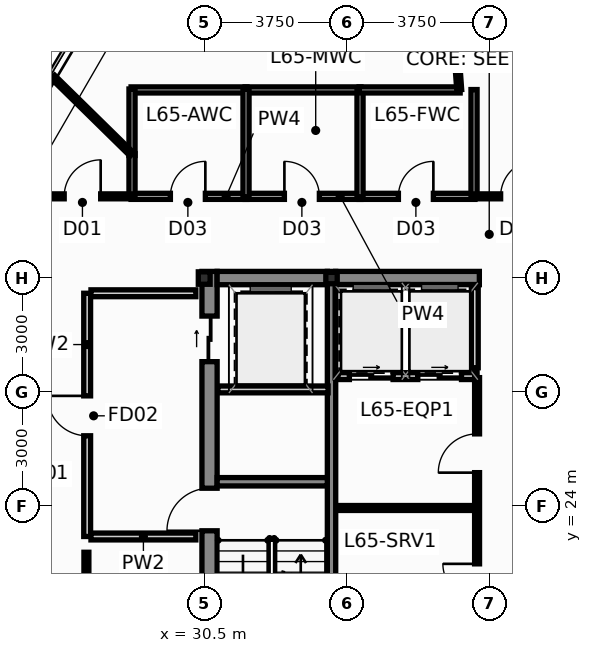
"""IFC4 building model, lengths in metres.
Left out: names, types, materials, properties, quantities, classifications, styles, units other than length and angle.
Written with IfcOpenShell. Run it as: python <this file> out.ifc"""

import sys

from ifc_helpers import new_model, si_unit, direction, frame, frame_2d, origin, origin_2d, place, context, subcontext, project, spatial, rectangle, hollow_rectangle, i_section, extrude, source, transform, mapped, element, fill, save


model = new_model("IFC4")
c1 = context("Model", 3, precision=1e-05, world=origin(), true_north=direction((0.0, 1.0)))
c2 = subcontext(c1, "Body", "Model", "MODEL_VIEW")
j1 = project(units=[si_unit("LENGTHUNIT", "METRE"), si_unit("PLANEANGLEUNIT", "RADIAN")], contexts=[c1])
p1 = place(None, origin())
s1 = spatial("IfcSite", under=j1, at=p1, CompositionType="ELEMENT")
p2 = place(p1, origin())
s2 = spatial("IfcBuilding", under=s1, at=p2, CompositionType="ELEMENT")
p3 = place(p2, frame((0.0, 0.0, 248.1)))
s3 = spatial("IfcBuildingStorey", under=s2, at=p3, CompositionType="ELEMENT", Elevation=248.1)
m1 = source(origin(), c2, "Body", "SweptSolid", [
    extrude(i_section(OverallWidth=0.311, OverallDepth=0.327, WebThickness=0.016, FlangeThickness=0.025, at=origin_2d()), origin(), (0.0, 0.0, 1.0), 3.65),
])
p4 = place(p3, frame((30.5, 30.0, 0.0), z_axis=(0.0, 0.0, 1.0), x_axis=(1.0, 0.0, 0.0)))
e1 = element("IfcColumn", 1, at=p4, inside=s3, PredefinedType="COLUMN", context=c2, shape_type="MappedRepresentation", body=[
    mapped(m1, transform((0.0, 0.0, 0.0), scale=1.0)),
])
m2 = source(origin(), c2, "Body", "SweptSolid", [
    extrude(hollow_rectangle(XDim=0.3, YDim=0.3, WallThickness=0.012, at=origin_2d()), origin(), (0.0, 0.0, 1.0), 3.65),
])
p5 = place(p3, frame((33.85, 30.0, 0.0), z_axis=(0.0, 0.0, 1.0), x_axis=(1.0, 0.0, 0.0)))
e2 = element("IfcColumn", 2, at=p5, inside=s3, PredefinedType="COLUMN", context=c2, shape_type="MappedRepresentation", body=[
    mapped(m2, transform((0.0, 0.0, 0.0), scale=1.0)),
])
p6 = place(p3, frame((30.64, 17.05, 0.0), z_axis=(0.0, 0.0, 1.0), x_axis=(0.0, 1.0, 0.0)))
e3 = element("IfcWall", 3, at=p6, inside=s3, PredefinedType="SHEAR", context=c2, shape_type="SweptSolid", body=[
    extrude(rectangle(XDim=13.125, YDim=0.4, at=frame_2d((6.562, 0.0))), origin(), (0.0, 0.0, 1.0), 3.65),
])
p7 = place(p6, frame((6.3, 0.0, 0.0)))
e4 = element("IfcOpeningElement", 4, at=p7, cuts=e3, PredefinedType="OPENING", context=c2, shape_type="SweptSolid", body=[
    extrude(rectangle(XDim=1.12, YDim=2.15, at=frame_2d((0.56, 1.075))), frame((0.0, 0.212, 0.0), z_axis=(0.0, -1.0, 0.0), x_axis=(1.0, 0.0, 0.0)), (0.0, 0.0, 1.0), 0.424),
])
p8 = place(p6, frame((10.75, 0.0, 0.0)))
e5 = element("IfcOpeningElement", 5, at=p8, cuts=e3, PredefinedType="OPENING", context=c2, shape_type="SweptSolid", body=[
    extrude(rectangle(XDim=1.2, YDim=2.2, at=frame_2d((0.6, 1.1))), frame((0.0, 0.212, 0.0), z_axis=(0.0, -1.0, 0.0), x_axis=(1.0, 0.0, 0.0)), (0.0, 0.0, 1.0), 0.424),
])
p9 = place(p3, frame((30.84, 30.0, 0.0), z_axis=(0.0, 0.0, 1.0), x_axis=(1.0, 0.0, 0.0)))
e6 = element("IfcWall", 6, at=p9, inside=s3, PredefinedType="SHEAR", context=c2, shape_type="SweptSolid", body=[
    extrude(rectangle(XDim=2.9, YDim=0.35, at=frame_2d((1.45, 0.0))), origin(), (0.0, 0.0, 1.0), 3.65),
])
p10 = place(p3, frame((33.96, 30.0, 0.0), z_axis=(0.0, 0.0, 1.0), x_axis=(1.0, 0.0, 0.0)))
e7 = element("IfcWall", 7, at=p10, inside=s3, PredefinedType="SHEAR", context=c2, shape_type="SweptSolid", body=[
    extrude(rectangle(XDim=3.78, YDim=0.35, at=frame_2d((1.89, 0.0))), origin(), (0.0, 0.0, 1.0), 3.65),
])
p11 = place(p3, frame((33.85, 17.05, 0.0), z_axis=(0.0, 0.0, 1.0), x_axis=(0.0, 1.0, 0.0)))
e8 = element("IfcWall", 8, at=p11, inside=s3, PredefinedType="SHEAR", context=c2, shape_type="SweptSolid", body=[
    extrude(rectangle(XDim=13.125, YDim=0.22, at=frame_2d((6.562, 0.0))), origin(), (0.0, 0.0, 1.0), 3.65),
])
p12 = place(p3, frame((30.84, 24.64, 0.0), z_axis=(0.0, 0.0, 1.0), x_axis=(1.0, 0.0, 0.0)))
e9 = element("IfcWall", 9, at=p12, inside=s3, PredefinedType="SHEAR", context=c2, shape_type="SweptSolid", body=[
    extrude(rectangle(XDim=2.9, YDim=0.22, at=frame_2d((1.45, 0.0))), origin(), (0.0, 0.0, 1.0), 3.65),
])
p13 = place(p3, frame((34.02, 27.42, 0.0), z_axis=(0.0, 0.0, 1.0), x_axis=(1.0, 0.0, 0.0)))
e10 = element("IfcWall", 10, at=p13, inside=s3, PredefinedType="PARTITIONING", context=c2, shape_type="SweptSolid", body=[
    extrude(rectangle(XDim=3.66, YDim=0.18, at=frame_2d((1.83, 0.0))), origin(), (0.0, 0.0, 1.0), 3.4),
])
p14 = place(p13, frame((0.3, 0.0, 0.0)))
e11 = element("IfcOpeningElement", 11, at=p14, cuts=e10, PredefinedType="OPENING", context=c2, shape_type="SweptSolid", body=[
    extrude(rectangle(XDim=1.15, YDim=2.2, at=frame_2d((0.575, 1.1))), frame((0.0, 0.102, 0.0), z_axis=(0.0, -1.0, 0.0), x_axis=(1.0, 0.0, 0.0)), (0.0, 0.0, 1.0), 0.204),
])
p15 = place(p13, frame((2.1, 0.0, 0.0)))
e12 = element("IfcOpeningElement", 12, at=p15, cuts=e10, PredefinedType="OPENING", context=c2, shape_type="SweptSolid", body=[
    extrude(rectangle(XDim=1.15, YDim=2.2, at=frame_2d((0.575, 1.1))), frame((0.0, 0.102, 0.0), z_axis=(0.0, -1.0, 0.0), x_axis=(1.0, 0.0, 0.0)), (0.0, 0.0, 1.0), 0.204),
])
p16 = place(p3, frame((37.62, 27.64, 0.0), z_axis=(0.0, 0.0, 1.0), x_axis=(0.0, 1.0, 0.0)))
e13 = element("IfcWall", 13, at=p16, inside=s3, PredefinedType="PARTITIONING", context=c2, shape_type="SweptSolid", body=[
    extrude(rectangle(XDim=2.11, YDim=0.18, at=frame_2d((1.055, 0.0))), origin(), (0.0, 0.0, 1.0), 3.4),
])
p17 = place(p3, frame((27.42, 23.2, 0.0), z_axis=(0.0, 0.0, 1.0), x_axis=(0.0, 1.0, 0.0)))
e14 = element("IfcWall", 14, at=p17, inside=s3, PredefinedType="PARTITIONING", context=c2, shape_type="SweptSolid", body=[
    extrude(rectangle(XDim=6.4, YDim=0.18, at=frame_2d((3.2, 0.0))), origin(), (0.0, 0.0, 1.0), 3.085),
])
p18 = place(p17, frame((2.65, 0.0, 0.0)))
e15 = element("IfcOpeningElement", 15, at=p18, cuts=e14, PredefinedType="OPENING", context=c2, shape_type="SweptSolid", body=[
    extrude(rectangle(XDim=1.05, YDim=2.15, at=frame_2d((0.525, 1.075))), frame((0.0, 0.102, 0.0), z_axis=(0.0, -1.0, 0.0), x_axis=(1.0, 0.0, 0.0)), (0.0, 0.0, 1.0), 0.204),
])
for number, where, z_axis, x_axis in (
    (16, (27.52, 23.2, 0.0), (0.0, 0.0, 1.0), (1.0, 0.0, 0.0)),
    (17, (27.52, 29.6, 0.0), (0.0, 0.0, 1.0), (1.0, 0.0, 0.0)),
):
    element("IfcWall", number, at=place(p3, frame(where, z_axis=z_axis, x_axis=x_axis)), inside=s3, PredefinedType="PARTITIONING", context=c2, shape_type="SweptSolid", body=[
        extrude(rectangle(XDim=2.76, YDim=0.18, at=frame_2d((1.38, 0.0))), origin(), (0.0, 0.0, 1.0), 3.4),
    ])
p19 = place(p3, frame((30.86, 27.07, 0.0), z_axis=(0.0, 0.0, 1.0), x_axis=(1.0, 0.0, 0.0)))
e18 = element("IfcWall", 18, at=p19, inside=s3, PredefinedType="PARTITIONING", context=c2, shape_type="SweptSolid", body=[
    extrude(rectangle(XDim=2.9, YDim=0.18, at=frame_2d((1.45, 0.0))), origin(), (0.0, 0.0, 1.0), 3.4),
])
p20 = place(p3, frame((34.02, 23.95, 0.0), z_axis=(0.0, 0.0, 1.0), x_axis=(1.0, 0.0, 0.0)))
e19 = element("IfcWall", 19, at=p20, inside=s3, PredefinedType="PARTITIONING", context=c2, shape_type="SweptSolid", body=[
    extrude(rectangle(XDim=3.58, YDim=0.13, at=frame_2d((1.79, 0.0))), origin(), (0.0, 0.0, 1.0), 3.4),
])
p21 = place(p3, frame((37.68, 20.48, 0.0), z_axis=(0.0, 0.0, 1.0), x_axis=(0.0, 1.0, 0.0)))
e20 = element("IfcWall", 20, at=p21, inside=s3, PredefinedType="PARTITIONING", context=c2, shape_type="SweptSolid", body=[
    extrude(rectangle(XDim=6.9, YDim=0.13, at=frame_2d((3.45, 0.0))), origin(), (0.0, 0.0, 1.0), 3.4),
])
p22 = place(p21, frame((1.1, 0.0, 0.0)))
e21 = element("IfcOpeningElement", 21, at=p22, cuts=e20, PredefinedType="OPENING", context=c2, shape_type="SweptSolid", body=[
    extrude(rectangle(XDim=0.9, YDim=2.1, at=frame_2d((0.45, 1.05))), frame((0.0, 0.077, 0.0), z_axis=(0.0, -1.0, 0.0), x_axis=(1.0, 0.0, 0.0)), (0.0, 0.0, 1.0), 0.154),
])
p23 = place(p21, frame((4.4, 0.0, 0.0)))
e22 = element("IfcOpeningElement", 22, at=p23, cuts=e20, PredefinedType="OPENING", context=c2, shape_type="SweptSolid", body=[
    extrude(rectangle(XDim=1.02, YDim=2.15, at=frame_2d((0.51, 1.075))), frame((0.0, 0.077, 0.0), z_axis=(0.0, -1.0, 0.0), x_axis=(1.0, 0.0, 0.0)), (0.0, 0.0, 1.0), 0.154),
])
p24 = place(p3, frame((28.575, 32.15, 0.0), z_axis=(0.0, 0.0, 1.0), x_axis=(1.0, 0.0, 0.0)))
e23 = element("IfcWall", 23, at=p24, inside=s3, PredefinedType="PLUMBINGWALL", context=c2, shape_type="SweptSolid", body=[
    extrude(rectangle(XDim=3.05, YDim=0.16, at=frame_2d((1.525, 0.0))), origin(), (0.0, 0.0, 1.0), 3.085),
])
p25 = place(p24, frame((1.035, 0.0, 0.0)))
e24 = element("IfcOpeningElement", 24, at=p25, cuts=e23, PredefinedType="OPENING", context=c2, shape_type="SweptSolid", body=[
    extrude(rectangle(XDim=0.92, YDim=2.1, at=frame_2d((0.46, 1.05))), frame((0.0, 0.092, 0.0), z_axis=(0.0, -1.0, 0.0), x_axis=(1.0, 0.0, 0.0)), (0.0, 0.0, 1.0), 0.184),
])
p26 = place(p3, frame((31.575, 32.15, 0.0), z_axis=(0.0, 0.0, 1.0), x_axis=(1.0, 0.0, 0.0)))
e25 = element("IfcWall", 25, at=p26, inside=s3, PredefinedType="PLUMBINGWALL", context=c2, shape_type="SweptSolid", body=[
    extrude(rectangle(XDim=3.05, YDim=0.16, at=frame_2d((1.525, 0.0))), origin(), (0.0, 0.0, 1.0), 3.085),
])
p27 = place(p26, frame((1.035, 0.0, 0.0)))
e26 = element("IfcOpeningElement", 26, at=p27, cuts=e25, PredefinedType="OPENING", context=c2, shape_type="SweptSolid", body=[
    extrude(rectangle(XDim=0.92, YDim=2.1, at=frame_2d((0.46, 1.05))), frame((0.0, 0.092, 0.0), z_axis=(0.0, -1.0, 0.0), x_axis=(1.0, 0.0, 0.0)), (0.0, 0.0, 1.0), 0.184),
])
p28 = place(p3, frame((34.575, 32.15, 0.0), z_axis=(0.0, 0.0, 1.0), x_axis=(1.0, 0.0, 0.0)))
e27 = element("IfcWall", 27, at=p28, inside=s3, PredefinedType="PLUMBINGWALL", context=c2, shape_type="SweptSolid", body=[
    extrude(rectangle(XDim=3.05, YDim=0.16, at=frame_2d((1.525, 0.0))), origin(), (0.0, 0.0, 1.0), 3.085),
])
p29 = place(p28, frame((1.035, 0.0, 0.0)))
e28 = element("IfcOpeningElement", 28, at=p29, cuts=e27, PredefinedType="OPENING", context=c2, shape_type="SweptSolid", body=[
    extrude(rectangle(XDim=0.92, YDim=2.1, at=frame_2d((0.46, 1.05))), frame((0.0, 0.092, 0.0), z_axis=(0.0, -1.0, 0.0), x_axis=(1.0, 0.0, 0.0)), (0.0, 0.0, 1.0), 0.184),
])
for number, where, z_axis, x_axis in (
    (29, (28.575, 34.95, 0.0), (0.0, 0.0, 1.0), (1.0, 0.0, 0.0)),
    (30, (31.575, 34.95, 0.0), (0.0, 0.0, 1.0), (1.0, 0.0, 0.0)),
):
    element("IfcWall", number, at=place(p3, frame(where, z_axis=z_axis, x_axis=x_axis)), inside=s3, PredefinedType="PLUMBINGWALL", context=c2, shape_type="SweptSolid", body=[
        extrude(rectangle(XDim=3.05, YDim=0.16, at=frame_2d((1.525, 0.0))), origin(), (0.0, 0.0, 1.0), 3.085),
    ])
p30 = place(p3, frame((31.6, 32.125, 0.0), z_axis=(0.0, 0.0, 1.0), x_axis=(0.0, 1.0, 0.0)))
e31 = element("IfcWall", 31, at=p30, inside=s3, PredefinedType="PLUMBINGWALL", context=c2, shape_type="SweptSolid", body=[
    extrude(rectangle(XDim=2.85, YDim=0.16, at=frame_2d((1.425, 0.0))), origin(), (0.0, 0.0, 1.0), 2.985),
])
p31 = place(p3, frame((34.6, 32.125, 0.0), z_axis=(0.0, 0.0, 1.0), x_axis=(0.0, 1.0, 0.0)))
e32 = element("IfcWall", 32, at=p31, inside=s3, PredefinedType="PLUMBINGWALL", context=c2, shape_type="SweptSolid", body=[
    extrude(rectangle(XDim=2.85, YDim=0.16, at=frame_2d((1.425, 0.0))), origin(), (0.0, 0.0, 1.0), 3.4),
])
p32 = place(p3, frame((37.6, 32.125, 0.0), z_axis=(0.0, 0.0, 1.0), x_axis=(0.0, 1.0, 0.0)))
e33 = element("IfcWall", 33, at=p32, inside=s3, PredefinedType="PLUMBINGWALL", context=c2, shape_type="SweptSolid", body=[
    extrude(rectangle(XDim=2.835, YDim=0.16, at=frame_2d((1.417, 0.0))), origin(), (0.0, 0.0, 1.0), 3.4),
])
p33 = place(p3, frame((34.575, 34.95, 0.0), z_axis=(0.0, 0.0, 1.0), x_axis=(1.0, 0.0, 0.0)))
e34 = element("IfcWall", 34, at=p33, inside=s3, PredefinedType="PLUMBINGWALL", context=c2, shape_type="SweptSolid", body=[
    extrude(rectangle(XDim=2.66, YDim=0.16, at=frame_2d((1.33, 0.0))), origin(), (0.0, 0.0, 1.0), 3.085),
])
p34 = place(p3, frame((28.6, 33.225, 0.0), z_axis=(0.0, 0.0, 1.0), x_axis=(0.0, 1.0, 0.0)))
e35 = element("IfcWall", 35, at=p34, inside=s3, PredefinedType="PLUMBINGWALL", context=c2, shape_type="SweptSolid", body=[
    extrude(rectangle(XDim=1.75, YDim=0.16, at=frame_2d((0.875, 0.0))), origin(), (0.0, 0.0, 1.0), 2.985),
])
p35 = place(p3, frame((28.6, 32.125, 0.0), z_axis=(0.0, 0.0, 1.0), x_axis=(0.0, 1.0, 0.0)))
e36 = element("IfcWall", 36, at=p35, inside=s3, PredefinedType="PLUMBINGWALL", context=c2, shape_type="SweptSolid", body=[
    extrude(rectangle(XDim=1.15, YDim=0.16, at=frame_2d((0.575, 0.0))), origin(), (0.0, 0.0, 1.0), 3.4),
])
p36 = place(p3, frame((36.156, 49.7, 0.0), z_axis=(0.0, 0.0, 1.0), x_axis=(0.071265829402, -0.997457358266, 0.0)))
e37 = element("IfcWall", 37, at=p36, inside=s3, PredefinedType="PARTITIONING", context=c2, shape_type="SweptSolid", body=[
    extrude(rectangle(XDim=14.782, YDim=0.13, at=frame_2d((7.391, 0.0))), origin(), (0.0, 0.0, 1.0), 3.4),
])
p37 = place(p36, frame((6.956, 0.0, 0.0)))
e38 = element("IfcOpeningElement", 38, at=p37, cuts=e37, PredefinedType="OPENING", context=c2, shape_type="SweptSolid", body=[
    extrude(rectangle(XDim=0.96, YDim=2.15, at=frame_2d((0.48, 1.075))), frame((0.0, 0.077, 0.0), z_axis=(0.0, -1.0, 0.0), x_axis=(1.0, 0.0, 0.0)), (0.0, 0.0, 1.0), 0.154),
])
p38 = place(p3, frame((27.4, 17.105, 0.0), z_axis=(0.0, 0.0, 1.0), x_axis=(0.0, 1.0, 0.0)))
e39 = element("IfcWall", 39, at=p38, inside=s3, PredefinedType="PARTITIONING", context=c2, shape_type="SweptSolid", body=[
    extrude(rectangle(XDim=5.68, YDim=0.13, at=frame_2d((2.84, 0.0))), origin(), (0.0, 0.0, 1.0), 3.085),
])
p39 = place(p38, frame((2.36, 0.0, 0.0)))
e40 = element("IfcOpeningElement", 40, at=p39, cuts=e39, PredefinedType="OPENING", context=c2, shape_type="SweptSolid", body=[
    extrude(rectangle(XDim=0.96, YDim=2.15, at=frame_2d((0.48, 1.075))), frame((0.0, 0.077, 0.0), z_axis=(0.0, -1.0, 0.0), x_axis=(1.0, 0.0, 0.0)), (0.0, 0.0, 1.0), 0.154),
])
p40 = place(p3, frame((24.676, 32.15, 0.0), z_axis=(0.0, 0.0, 1.0), x_axis=(1.0, 0.0, 0.0)))
e41 = element("IfcWall", 41, at=p40, inside=s3, PredefinedType="PARTITIONING", context=c2, shape_type="SweptSolid", body=[
    extrude(rectangle(XDim=3.919, YDim=0.13, at=frame_2d((1.96, 0.0))), origin(), (0.0, 0.0, 1.0), 3.4),
])
p41 = place(p40, frame((2.14, 0.0, 0.0)))
e42 = element("IfcOpeningElement", 42, at=p41, cuts=e41, PredefinedType="OPENING", context=c2, shape_type="SweptSolid", body=[
    extrude(rectangle(XDim=0.96, YDim=2.15, at=frame_2d((0.48, 1.075))), frame((0.0, 0.077, 0.0), z_axis=(0.0, -1.0, 0.0), x_axis=(1.0, 0.0, 0.0)), (0.0, 0.0, 1.0), 0.154),
])
p42 = place(p3, frame((26.518, 35.293, 0.0), z_axis=(0.0, 0.0, 1.0), x_axis=(0.713701169146, -0.700450313127, 0.0)))
e43 = element("IfcWall", 43, at=p42, inside=s3, PredefinedType="PARTITIONING", context=c2, shape_type="SweptSolid", body=[
    extrude(rectangle(XDim=2.911, YDim=0.13, at=frame_2d((1.456, 0.0))), origin(), (0.0, 0.0, 1.0), 3.4),
])
p43 = place(p3, frame((37.605, 32.15, 0.0), z_axis=(0.0, 0.0, 1.0), x_axis=(1.0, 0.0, 0.0)))
e44 = element("IfcWall", 44, at=p43, inside=s3, PredefinedType="PARTITIONING", context=c2, shape_type="SweptSolid", body=[
    extrude(rectangle(XDim=2.35, YDim=0.13, at=frame_2d((1.175, 0.0))), origin(), (0.0, 0.0, 1.0), 3.085),
])
p44 = place(p43, frame((0.695, 0.0, 0.0)))
e45 = element("IfcOpeningElement", 45, at=p44, cuts=e44, PredefinedType="OPENING", context=c2, shape_type="SweptSolid", body=[
    extrude(rectangle(XDim=0.96, YDim=2.15, at=frame_2d((0.48, 1.075))), frame((0.0, 0.077, 0.0), z_axis=(0.0, -1.0, 0.0), x_axis=(1.0, 0.0, 0.0)), (0.0, 0.0, 1.0), 0.154),
])
p45 = place(p7, origin())
e46 = element("IfcDoor", 46, at=p45, inside=s3, OperationType="SINGLE_SWING_LEFT", PredefinedType="DOOR", context=c2, shape_type="SweptSolid", body=[
    extrude(rectangle(XDim=1.12, YDim=2.15, at=frame_2d((0.56, 1.075))), frame((0.0, 0.025, 0.0), z_axis=(0.0, -1.0, 0.0), x_axis=(1.0, 0.0, 0.0)), (0.0, 0.0, 1.0), 0.05),
])
fill(e4, e46)
p46 = place(p8, origin())
e47 = element("IfcDoor", 47, at=p46, inside=s3, OperationType="SLIDING_TO_LEFT", PredefinedType="DOOR", context=c2, shape_type="SweptSolid", body=[
    extrude(rectangle(XDim=1.2, YDim=2.2, at=frame_2d((0.6, 1.1))), frame((0.0, 0.025, 0.0), z_axis=(0.0, -1.0, 0.0), x_axis=(1.0, 0.0, 0.0)), (0.0, 0.0, 1.0), 0.05),
])
fill(e5, e47)
p47 = place(p14, origin())
e48 = element("IfcDoor", 48, at=p47, inside=s3, OperationType="SLIDING_TO_RIGHT", PredefinedType="DOOR", context=c2, shape_type="SweptSolid", body=[
    extrude(rectangle(XDim=1.15, YDim=2.2, at=frame_2d((0.575, 1.1))), frame((0.0, 0.025, 0.0), z_axis=(0.0, -1.0, 0.0), x_axis=(1.0, 0.0, 0.0)), (0.0, 0.0, 1.0), 0.05),
])
fill(e11, e48)
p48 = place(p15, origin())
e49 = element("IfcDoor", 49, at=p48, inside=s3, OperationType="SLIDING_TO_LEFT", PredefinedType="DOOR", context=c2, shape_type="SweptSolid", body=[
    extrude(rectangle(XDim=1.15, YDim=2.2, at=frame_2d((0.575, 1.1))), frame((0.0, 0.025, 0.0), z_axis=(0.0, -1.0, 0.0), x_axis=(1.0, 0.0, 0.0)), (0.0, 0.0, 1.0), 0.05),
])
fill(e12, e49)
p49 = place(p18, origin())
e50 = element("IfcDoor", 50, at=p49, inside=s3, OperationType="SINGLE_SWING_RIGHT", PredefinedType="DOOR", context=c2, shape_type="SweptSolid", body=[
    extrude(rectangle(XDim=1.05, YDim=2.15, at=frame_2d((0.525, 1.075))), frame((0.0, 0.025, 0.0), z_axis=(0.0, -1.0, 0.0), x_axis=(1.0, 0.0, 0.0)), (0.0, 0.0, 1.0), 0.05),
])
fill(e15, e50)
p50 = place(p22, origin())
e51 = element("IfcDoor", 51, at=p50, inside=s3, OperationType="SINGLE_SWING_RIGHT", PredefinedType="DOOR", context=c2, shape_type="SweptSolid", body=[
    extrude(rectangle(XDim=0.9, YDim=2.1, at=frame_2d((0.45, 1.05))), frame((0.0, 0.025, 0.0), z_axis=(0.0, -1.0, 0.0), x_axis=(1.0, 0.0, 0.0)), (0.0, 0.0, 1.0), 0.05),
])
fill(e21, e51)
p51 = place(p23, origin())
e52 = element("IfcDoor", 52, at=p51, inside=s3, OperationType="SINGLE_SWING_LEFT", PredefinedType="DOOR", context=c2, shape_type="SweptSolid", body=[
    extrude(rectangle(XDim=1.02, YDim=2.15, at=frame_2d((0.51, 1.075))), frame((0.0, 0.025, 0.0), z_axis=(0.0, -1.0, 0.0), x_axis=(1.0, 0.0, 0.0)), (0.0, 0.0, 1.0), 0.05),
])
fill(e22, e52)
p52 = place(p25, origin())
e53 = element("IfcDoor", 53, at=p52, inside=s3, OperationType="SINGLE_SWING_RIGHT", PredefinedType="DOOR", context=c2, shape_type="SweptSolid", body=[
    extrude(rectangle(XDim=0.92, YDim=2.1, at=frame_2d((0.46, 1.05))), frame((0.0, 0.025, 0.0), z_axis=(0.0, -1.0, 0.0), x_axis=(1.0, 0.0, 0.0)), (0.0, 0.0, 1.0), 0.05),
])
fill(e24, e53)
p53 = place(p27, origin())
e54 = element("IfcDoor", 54, at=p53, inside=s3, OperationType="SINGLE_SWING_LEFT", PredefinedType="DOOR", context=c2, shape_type="SweptSolid", body=[
    extrude(rectangle(XDim=0.92, YDim=2.1, at=frame_2d((0.46, 1.05))), frame((0.0, 0.025, 0.0), z_axis=(0.0, -1.0, 0.0), x_axis=(1.0, 0.0, 0.0)), (0.0, 0.0, 1.0), 0.05),
])
fill(e26, e54)
p54 = place(p29, origin())
e55 = element("IfcDoor", 55, at=p54, inside=s3, OperationType="SINGLE_SWING_RIGHT", PredefinedType="DOOR", context=c2, shape_type="SweptSolid", body=[
    extrude(rectangle(XDim=0.92, YDim=2.1, at=frame_2d((0.46, 1.05))), frame((0.0, 0.025, 0.0), z_axis=(0.0, -1.0, 0.0), x_axis=(1.0, 0.0, 0.0)), (0.0, 0.0, 1.0), 0.05),
])
fill(e28, e55)
p55 = place(p41, origin())
e56 = element("IfcDoor", 56, at=p55, inside=s3, OperationType="SINGLE_SWING_RIGHT", PredefinedType="DOOR", context=c2, shape_type="SweptSolid", body=[
    extrude(rectangle(XDim=0.96, YDim=2.15, at=frame_2d((0.48, 1.075))), frame((0.0, 0.025, 0.0), z_axis=(0.0, -1.0, 0.0), x_axis=(1.0, 0.0, 0.0)), (0.0, 0.0, 1.0), 0.05),
])
fill(e42, e56)
p56 = place(p44, origin())
e57 = element("IfcDoor", 57, at=p56, inside=s3, OperationType="SINGLE_SWING_RIGHT", PredefinedType="DOOR", context=c2, shape_type="SweptSolid", body=[
    extrude(rectangle(XDim=0.96, YDim=2.15, at=frame_2d((0.48, 1.075))), frame((0.0, 0.025, 0.0), z_axis=(0.0, -1.0, 0.0), x_axis=(1.0, 0.0, 0.0)), (0.0, 0.0, 1.0), 0.05),
])
fill(e45, e57)
save(model, sys.argv[1])
